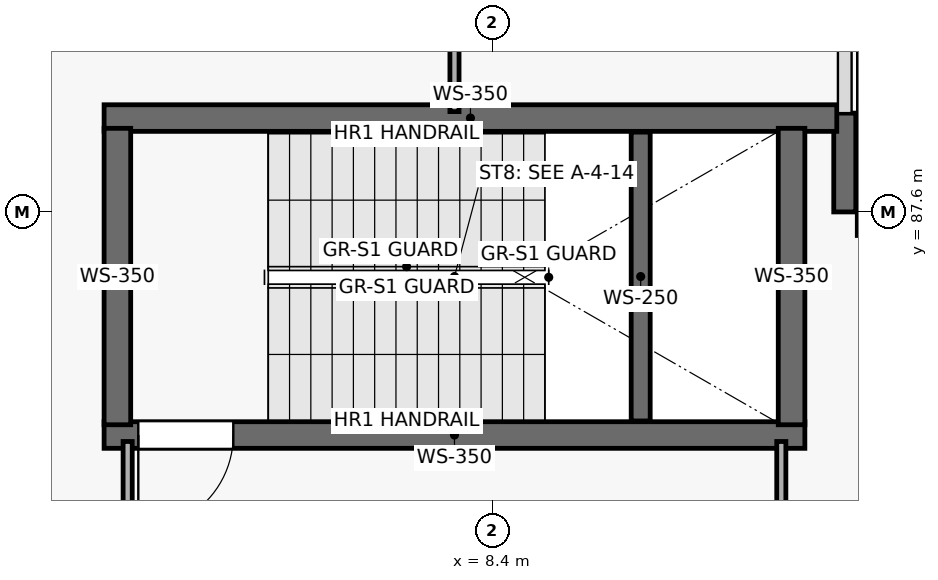
"""IFC4 building model, lengths in metres.
Left out: names, types, materials, properties, quantities, classifications, styles, units other than length and angle.
Written with IfcOpenShell. Run it as: python <this file> out.ifc"""

import sys

from ifc_helpers import new_model, si_unit, direction, frame, frame_2d, origin, place, context, subcontext, project, spatial, rectangle, extrude, element, fill, save


model = new_model("IFC4")
c1 = context("Model", 3, precision=1e-05, world=origin(), true_north=direction((0.0, 1.0)))
c2 = subcontext(c1, "Body", "Model", "MODEL_VIEW")
j1 = project(units=[si_unit("LENGTHUNIT", "METRE"), si_unit("PLANEANGLEUNIT", "RADIAN")], contexts=[c1])
p1 = place(None, origin())
s1 = spatial("IfcSite", under=j1, at=p1, CompositionType="ELEMENT")
p2 = place(p1, origin())
s2 = spatial("IfcBuilding", under=s1, at=p2, CompositionType="ELEMENT")
p3 = place(p2, frame((0.0, 0.0, 20.4)))
s3 = spatial("IfcBuildingStorey", under=s2, at=p3, CompositionType="ELEMENT", Elevation=20.4)
p4 = place(p3, frame((13.035, 88.9, 0.0), z_axis=(0.0, 0.0, 1.0), x_axis=(0.0, -1.0, 0.0)))
e1 = element("IfcWall", 1, at=p4, inside=s3, PredefinedType="SOLIDWALL", context=c2, shape_type="SweptSolid", body=[
    extrude(rectangle(XDim=1.3, YDim=0.29, at=frame_2d((0.65, 0.0))), origin(), (0.0, 0.0, 1.0), 4.84),
])
p5 = place(p3, frame((3.29, 84.665, 0.0), z_axis=(0.0, 0.0, 1.0), x_axis=(1.0, 0.0, 0.0)))
e2 = element("IfcWall", 2, at=p5, inside=s3, PredefinedType="SHEAR", context=c2, shape_type="SweptSolid", body=[
    extrude(rectangle(XDim=9.22, YDim=0.35, at=frame_2d((4.61, 0.0))), origin(), (0.0, 0.0, 1.0), 4.84),
])
p6 = place(p5, frame((0.45, 0.0, 0.0)))
e3 = element("IfcOpeningElement", 3, at=p6, cuts=e2, PredefinedType="OPENING", context=c2, shape_type="SweptSolid", body=[
    extrude(rectangle(XDim=1.25, YDim=2.2, at=frame_2d((0.625, 1.1))), frame((0.0, 0.185, 0.0), z_axis=(0.0, -1.0, 0.0), x_axis=(1.0, 0.0, 0.0)), (0.0, 0.0, 1.0), 0.37),
])
p7 = place(p3, frame((12.93, 88.835, 0.0), z_axis=(0.0, 0.0, 1.0), x_axis=(-1.0, 0.0, 0.0)))
e4 = element("IfcWall", 4, at=p7, inside=s3, PredefinedType="SHEAR", context=c2, shape_type="SweptSolid", body=[
    extrude(rectangle(XDim=9.64, YDim=0.35, at=frame_2d((4.82, 0.0))), origin(), (0.0, 0.0, 1.0), 4.84),
])
for number, where, z_axis, x_axis in (
    (5, (3.465, 84.8, 0.0), (0.0, 0.0, 1.0), (0.0, 1.0, 0.0)),
    (6, (12.335, 88.7, 0.0), (0.0, 0.0, 1.0), (0.0, -1.0, 0.0)),
):
    element("IfcWall", number, at=place(p3, frame(where, z_axis=z_axis, x_axis=x_axis)), inside=s3, PredefinedType="SHEAR", context=c2, shape_type="SweptSolid", body=[
        extrude(rectangle(XDim=3.9, YDim=0.35, at=frame_2d((1.95, 0.0))), origin(), (0.0, 0.0, 1.0), 4.84),
    ])
p8 = place(p3, frame((10.35, 84.85, 0.0), z_axis=(0.0, 0.0, 1.0), x_axis=(0.0, 1.0, 0.0)))
e7 = element("IfcWall", 7, at=p8, inside=s3, PredefinedType="SHEAR", context=c2, shape_type="SweptSolid", body=[
    extrude(rectangle(XDim=3.8, YDim=0.25, at=frame_2d((1.9, 0.0))), origin(), (0.0, 0.0, 1.0), 2.37),
])
p9 = place(p3, frame((7.9, 94.74, 0.0), z_axis=(0.0, 0.0, 1.0), x_axis=(0.0, -1.0, 0.0)))
e8 = element("IfcWall", 8, at=p9, inside=s3, PredefinedType="PARTITIONING", context=c2, shape_type="SweptSolid", body=[
    extrude(rectangle(XDim=5.82, YDim=0.12, at=frame_2d((2.91, 0.0))), origin(), (0.0, 0.0, 1.0), 4.84),
])
p10 = place(p3, frame((3.6, 84.58, 0.0), z_axis=(0.0, 0.0, 1.0), x_axis=(0.0, -1.0, 0.0)))
e9 = element("IfcWall", 9, at=p10, inside=s3, PredefinedType="PARTITIONING", context=c2, shape_type="SweptSolid", body=[
    extrude(rectangle(XDim=2.64, YDim=0.12, at=frame_2d((1.32, 0.0))), origin(), (0.0, 0.0, 1.0), 4.84),
])
p11 = place(p3, frame((12.2, 81.8, 0.0), z_axis=(0.0, 0.0, 1.0), x_axis=(0.0, 1.0, 0.0)))
e10 = element("IfcWall", 10, at=p11, inside=s3, PredefinedType="PARTITIONING", context=c2, shape_type="SweptSolid", body=[
    extrude(rectangle(XDim=2.78, YDim=0.12, at=frame_2d((1.39, 0.0))), origin(), (0.0, 0.0, 1.0), 4.84),
])
p12 = place(p6, origin())
e11 = element("IfcDoor", 11, at=p12, inside=s3, OperationType="SINGLE_SWING_RIGHT", PredefinedType="DOOR", context=c2, shape_type="SweptSolid", body=[
    extrude(rectangle(XDim=1.25, YDim=2.2, at=frame_2d((0.625, 1.1))), frame((0.0, 0.025, 0.0), z_axis=(0.0, -1.0, 0.0), x_axis=(1.0, 0.0, 0.0)), (0.0, 0.0, 1.0), 0.05),
])
fill(e3, e11)
save(model, sys.argv[1])
